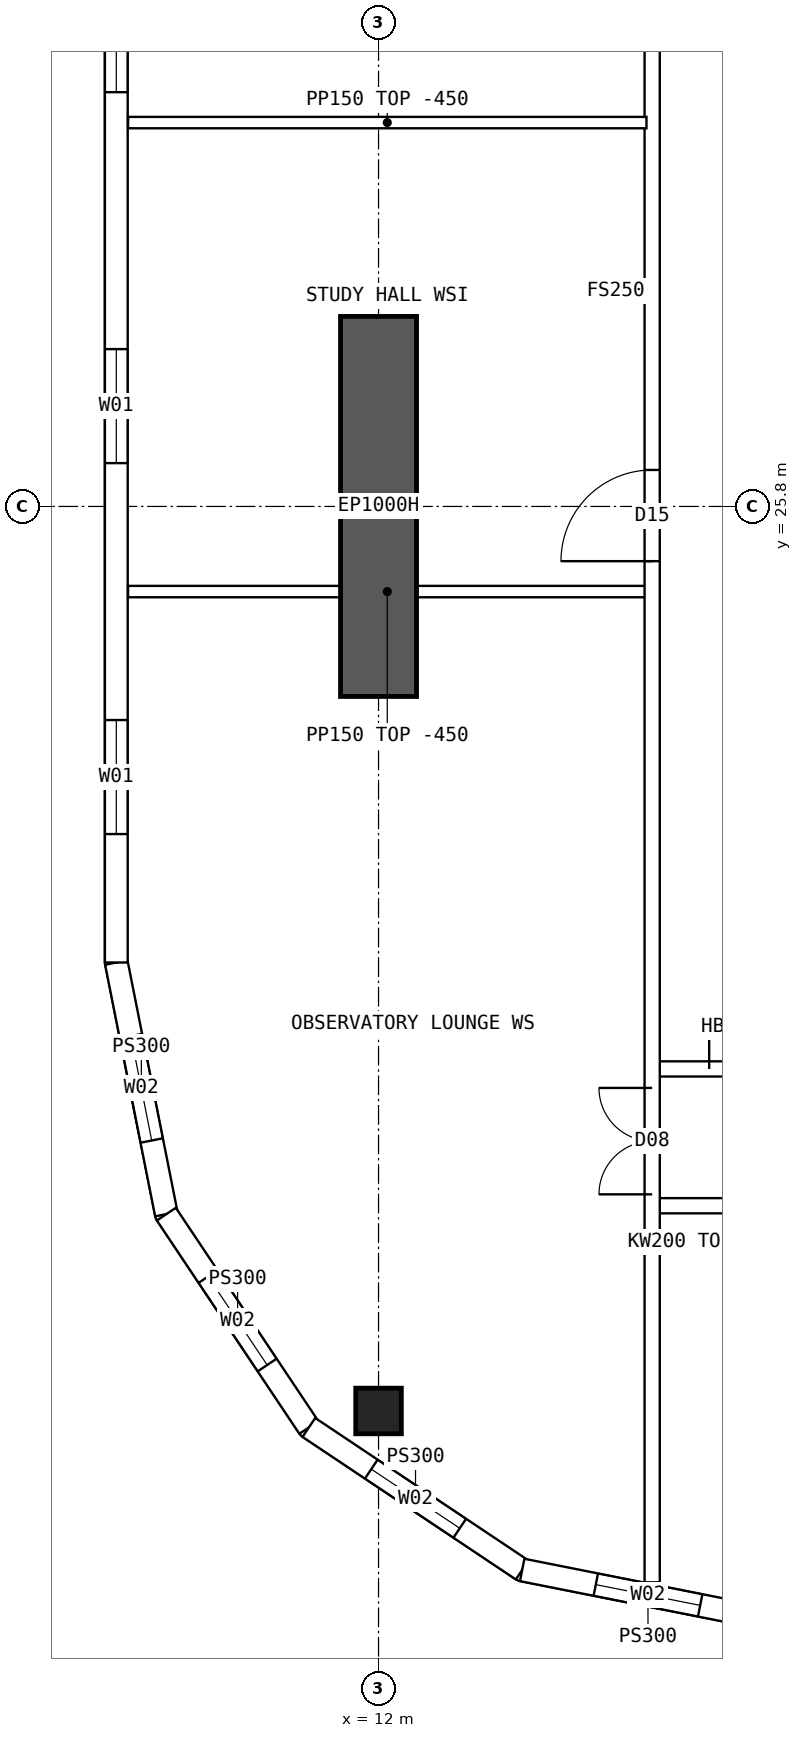
"""IFC4 building model, lengths in metres.
Left out: names, types, materials, properties, quantities, classifications, styles, units other than length and angle.
Written with IfcOpenShell. Run it as: python <this file> out.ifc"""

import sys

from ifc_helpers import new_model, si_unit, direction, frame, frame_2d, origin, origin_2d, place, context, subcontext, project, spatial, polyline, rectangle, hollow_rectangle, outline, extrude, element, fill, save


model = new_model("IFC4")
c1 = context("Model", 3, precision=1e-05, world=origin(), true_north=direction((0.0, 1.0)))
c2 = subcontext(c1, "Body", "Model", "MODEL_VIEW")
j1 = project(units=[si_unit("LENGTHUNIT", "METRE"), si_unit("PLANEANGLEUNIT", "RADIAN")], contexts=[c1])
p1 = place(None, origin())
s1 = spatial("IfcSite", under=j1, at=p1, CompositionType="ELEMENT")
p2 = place(p1, origin())
s2 = spatial("IfcBuilding", under=s1, at=p2, CompositionType="ELEMENT")
p3 = place(p2, frame((0.0, 0.0, 212.8)))
s3 = spatial("IfcBuildingStorey", under=s2, at=p3, CompositionType="ELEMENT", Elevation=212.8)
p4 = place(p3, frame((12.0, 13.9, 0.0), z_axis=(0.0, 0.0, 1.0), x_axis=(1.0, 0.0, 0.0)))
e1 = element("IfcColumn", 1, at=p4, inside=s3, PredefinedType="COLUMN", context=c2, shape_type="SweptSolid", body=[
    extrude(hollow_rectangle(XDim=0.6, YDim=0.6, WallThickness=0.06, at=origin_2d()), origin(), (0.0, 0.0, 1.0), 3.75),
])
p5 = place(p3, frame((12.0, 23.3, 0.0), z_axis=(0.0, 0.0, 1.0), x_axis=(0.0, 1.0, 0.0)))
e2 = element("IfcWall", 2, at=p5, inside=s3, PredefinedType="SHEAR", context=c2, shape_type="SweptSolid", body=[
    extrude(rectangle(XDim=5.0, YDim=1.0, at=frame_2d((2.5, 0.0))), origin(), (0.0, 0.0, 1.0), 3.75),
])
p6 = place(p3, frame((8.55, 44.2, 0.0), z_axis=(0.0, 0.0, 1.0), x_axis=(0.0, -1.0, 0.0)))
e3 = element("IfcWall", 3, at=p6, inside=s3, PredefinedType="SOLIDWALL", context=c2, shape_type="SweptSolid", body=[
    extrude(outline(polyline([(-0.015, -0.15), (24.415, -0.15), (24.385, 0.15), (0.015, 0.15), (-0.015, -0.15)])), origin(), (0.0, 0.0, 1.0), 3.3),
])
p7 = place(p6, frame((1.69, 0.0, 0.9)))
e4 = element("IfcOpeningElement", 4, at=p7, cuts=e3, PredefinedType="OPENING", context=c2, shape_type="SweptSolid", body=[
    extrude(rectangle(XDim=1.5, YDim=2.0, at=frame_2d((0.75, 1.0))), frame((0.0, 0.16, 0.0), z_axis=(0.0, -1.0, 0.0), x_axis=(1.0, 0.0, 0.0)), (0.0, 0.0, 1.0), 0.32),
])
p8 = place(p6, frame((6.57, 0.0, 0.9)))
e5 = element("IfcOpeningElement", 5, at=p8, cuts=e3, PredefinedType="OPENING", context=c2, shape_type="SweptSolid", body=[
    extrude(rectangle(XDim=1.5, YDim=2.0, at=frame_2d((0.75, 1.0))), frame((0.0, 0.16, 0.0), z_axis=(0.0, -1.0, 0.0), x_axis=(1.0, 0.0, 0.0)), (0.0, 0.0, 1.0), 0.32),
])
p9 = place(p6, frame((11.45, 0.0, 0.9)))
e6 = element("IfcOpeningElement", 6, at=p9, cuts=e3, PredefinedType="OPENING", context=c2, shape_type="SweptSolid", body=[
    extrude(rectangle(XDim=1.5, YDim=2.0, at=frame_2d((0.75, 1.0))), frame((0.0, 0.16, 0.0), z_axis=(0.0, -1.0, 0.0), x_axis=(1.0, 0.0, 0.0)), (0.0, 0.0, 1.0), 0.32),
])
p10 = place(p6, frame((16.33, 0.0, 0.9)))
e7 = element("IfcOpeningElement", 7, at=p10, cuts=e3, PredefinedType="OPENING", context=c2, shape_type="SweptSolid", body=[
    extrude(rectangle(XDim=1.5, YDim=2.0, at=frame_2d((0.75, 1.0))), frame((0.0, 0.16, 0.0), z_axis=(0.0, -1.0, 0.0), x_axis=(1.0, 0.0, 0.0)), (0.0, 0.0, 1.0), 0.32),
])
p11 = place(p6, frame((21.21, 0.0, 0.9)))
e8 = element("IfcOpeningElement", 8, at=p11, cuts=e3, PredefinedType="OPENING", context=c2, shape_type="SweptSolid", body=[
    extrude(rectangle(XDim=1.5, YDim=2.0, at=frame_2d((0.75, 1.0))), frame((0.0, 0.16, 0.0), z_axis=(0.0, -1.0, 0.0), x_axis=(1.0, 0.0, 0.0)), (0.0, 0.0, 1.0), 0.32),
])
p12 = place(p3, frame((8.55, 19.8, 0.0), z_axis=(0.0, 0.0, 1.0), x_axis=(0.19508664885, -0.980786011034, 0.0)))
e9 = element("IfcWall", 9, at=p12, inside=s3, PredefinedType="SOLIDWALL", context=c2, shape_type="SweptSolid", body=[
    extrude(outline(polyline([(-0.015, -0.15), (3.405, -0.15), (3.345, 0.15), (0.015, 0.15), (-0.015, -0.15)])), origin(), (0.0, 0.0, 1.0), 3.3),
])
p13 = place(p12, frame((0.988, 0.0, 0.9)))
e10 = element("IfcOpeningElement", 10, at=p13, cuts=e9, PredefinedType="OPENING", context=c2, shape_type="SweptSolid", body=[
    extrude(rectangle(XDim=1.4, YDim=1.8, at=frame_2d((0.7, 0.9))), frame((0.0, 0.16, 0.0), z_axis=(0.0, -1.0, 0.0), x_axis=(1.0, 0.0, 0.0)), (0.0, 0.0, 1.0), 0.32),
])
p14 = place(p3, frame((9.208, 16.49, 0.0), z_axis=(0.0, 0.0, 1.0), x_axis=(0.555567969291, -0.831471124873, 0.0)))
e11 = element("IfcWall", 11, at=p14, inside=s3, PredefinedType="SOLIDWALL", context=c2, shape_type="SweptSolid", body=[
    extrude(outline(polyline([(-0.03, -0.15), (3.405, -0.15), (3.345, 0.15), (0.03, 0.15), (-0.03, -0.15)])), origin(), (0.0, 0.0, 1.0), 3.3),
])
p15 = place(p14, frame((0.988, 0.0, 0.9)))
e12 = element("IfcOpeningElement", 12, at=p15, cuts=e11, PredefinedType="OPENING", context=c2, shape_type="SweptSolid", body=[
    extrude(rectangle(XDim=1.4, YDim=1.8, at=frame_2d((0.7, 0.9))), frame((0.0, 0.16, 0.0), z_axis=(0.0, -1.0, 0.0), x_axis=(1.0, 0.0, 0.0)), (0.0, 0.0, 1.0), 0.32),
])
p16 = place(p3, frame((11.083, 13.684, 0.0), z_axis=(0.0, 0.0, 1.0), x_axis=(0.831460037396, -0.555584562613, 0.0)))
e13 = element("IfcWall", 13, at=p16, inside=s3, PredefinedType="SOLIDWALL", context=c2, shape_type="SweptSolid", body=[
    extrude(outline(polyline([(-0.03, -0.15), (3.405, -0.15), (3.345, 0.15), (0.03, 0.15), (-0.03, -0.15)])), origin(), (0.0, 0.0, 1.0), 3.3),
])
p17 = place(p16, frame((0.988, 0.0, 0.9)))
e14 = element("IfcOpeningElement", 14, at=p17, cuts=e13, PredefinedType="OPENING", context=c2, shape_type="SweptSolid", body=[
    extrude(rectangle(XDim=1.4, YDim=1.8, at=frame_2d((0.7, 0.9))), frame((0.0, 0.16, 0.0), z_axis=(0.0, -1.0, 0.0), x_axis=(1.0, 0.0, 0.0)), (0.0, 0.0, 1.0), 0.32),
])
p18 = place(p3, frame((13.89, 11.808, 0.0), z_axis=(0.0, 0.0, 1.0), x_axis=(0.98078325777, -0.195100490205, 0.0)))
e15 = element("IfcWall", 15, at=p18, inside=s3, PredefinedType="SOLIDWALL", context=c2, shape_type="SweptSolid", body=[
    extrude(outline(polyline([(-0.03, -0.15), (3.405, -0.15), (3.345, 0.15), (0.03, 0.15), (-0.03, -0.15)])), origin(), (0.0, 0.0, 1.0), 3.3),
])
p19 = place(p18, frame((0.988, 0.0, 0.9)))
e16 = element("IfcOpeningElement", 16, at=p19, cuts=e15, PredefinedType="OPENING", context=c2, shape_type="SweptSolid", body=[
    extrude(rectangle(XDim=1.4, YDim=1.8, at=frame_2d((0.7, 0.9))), frame((0.0, 0.16, 0.0), z_axis=(0.0, -1.0, 0.0), x_axis=(1.0, 0.0, 0.0)), (0.0, 0.0, 1.0), 0.32),
])
p20 = place(p3, frame((15.6, 16.6, 0.0), z_axis=(0.0, 0.0, 1.0), x_axis=(1.0, 0.0, 0.0)))
e17 = element("IfcWall", 17, at=p20, inside=s3, PredefinedType="SOLIDWALL", context=c2, shape_type="SweptSolid", body=[
    extrude(rectangle(XDim=2.05, YDim=0.2, at=frame_2d((1.025, 0.0))), origin(), (0.0, 0.0, 1.0), 3.3),
])
p21 = place(p20, frame((0.95, 0.0, 0.0)))
e18 = element("IfcOpeningElement", 18, at=p21, cuts=e17, PredefinedType="OPENING", context=c2, shape_type="SweptSolid", body=[
    extrude(rectangle(XDim=0.9, YDim=2.1, at=frame_2d((0.45, 1.05))), frame((0.0, 0.11, 0.0), z_axis=(0.0, -1.0, 0.0), x_axis=(1.0, 0.0, 0.0)), (0.0, 0.0, 1.0), 0.22),
])
p22 = place(p3, frame((15.6, 18.4, 0.0), z_axis=(0.0, 0.0, 1.0), x_axis=(1.0, 0.0, 0.0)))
e19 = element("IfcWall", 19, at=p22, inside=s3, PredefinedType="SOLIDWALL", context=c2, shape_type="SweptSolid", body=[
    extrude(rectangle(XDim=2.05, YDim=0.2, at=frame_2d((1.025, 0.0))), origin(), (0.0, 0.0, 1.0), 3.3),
])
p23 = place(p22, frame((0.75, 0.0, 0.0)))
e20 = element("IfcOpeningElement", 20, at=p23, cuts=e19, PredefinedType="OPENING", context=c2, shape_type="SweptSolid", body=[
    extrude(rectangle(XDim=1.2, YDim=2.1, at=frame_2d((0.6, 1.05))), frame((0.0, 0.11, 0.0), z_axis=(0.0, -1.0, 0.0), x_axis=(1.0, 0.0, 0.0)), (0.0, 0.0, 1.0), 0.22),
])
p24 = place(p3, frame((8.705, 30.85, 0.0), z_axis=(0.0, 0.0, 1.0), x_axis=(1.0, 0.0, 0.0)))
e21 = element("IfcWall", 21, at=p24, inside=s3, PredefinedType="PARTITIONING", context=c2, shape_type="SweptSolid", body=[
    extrude(outline(polyline([(0.0, 0.0), (6.82, 0.0), (6.82, 3.3), (3.597, 3.3), (3.595, 2.85), (2.997, 2.85), (2.995, 3.3), (0.0, 3.3), (0.0, 0.0)])), frame((0.0, 0.075, 0.0), z_axis=(0.0, -1.0, 0.0), x_axis=(1.0, 0.0, 0.0)), (0.0, 0.0, 1.0), 0.15),
])
p25 = place(p3, frame((15.6, 11.646, 0.0), z_axis=(0.0, 0.0, 1.0), x_axis=(0.0, 1.0, 0.0)))
e22 = element("IfcWall", 22, at=p25, inside=s3, PredefinedType="SOLIDWALL", context=c2, shape_type="SweptSolid", body=[
    extrude(rectangle(XDim=40.708, YDim=0.2, at=frame_2d((20.354, 0.0))), origin(), (0.0, 0.0, 1.0), 3.3),
])
p26 = place(p25, frame((13.434, 0.0, 0.0)))
e23 = element("IfcOpeningElement", 23, at=p26, cuts=e22, PredefinedType="OPENING", context=c2, shape_type="SweptSolid", body=[
    extrude(rectangle(XDim=1.2, YDim=2.1, at=frame_2d((0.6, 1.05))), frame((0.0, 0.11, 0.0), z_axis=(0.0, -1.0, 0.0), x_axis=(1.0, 0.0, 0.0)), (0.0, 0.0, 1.0), 0.22),
])
p27 = place(p25, frame((5.104, 0.0, 0.0)))
e24 = element("IfcOpeningElement", 24, at=p27, cuts=e22, PredefinedType="OPENING", context=c2, shape_type="SweptSolid", body=[
    extrude(rectangle(XDim=1.4, YDim=2.1, at=frame_2d((0.7, 1.05))), frame((0.0, 0.11, 0.0), z_axis=(0.0, -1.0, 0.0), x_axis=(1.0, 0.0, 0.0)), (0.0, 0.0, 1.0), 0.22),
])
p28 = place(p25, frame((34.104, 0.0, 0.0)))
e25 = element("IfcOpeningElement", 25, at=p28, cuts=e22, PredefinedType="OPENING", context=c2, shape_type="SweptSolid", body=[
    extrude(rectangle(XDim=1.4, YDim=2.1, at=frame_2d((0.7, 1.05))), frame((0.0, 0.11, 0.0), z_axis=(0.0, -1.0, 0.0), x_axis=(1.0, 0.0, 0.0)), (0.0, 0.0, 1.0), 0.22),
])
p29 = place(p3, frame((8.705, 24.68, 0.0), z_axis=(0.0, 0.0, 1.0), x_axis=(1.0, 0.0, 0.0)))
e26 = element("IfcWall", 26, at=p29, inside=s3, PredefinedType="PARTITIONING", context=c2, shape_type="SweptSolid", body=[
    extrude(rectangle(XDim=6.82, YDim=0.15, at=frame_2d((3.41, 0.0))), origin(), (0.0, 0.0, 1.0), 3.3),
])
p30 = place(p9, origin())
e27 = element("IfcWindow", 27, at=p30, inside=s3, PartitioningType="SINGLE_PANEL", PredefinedType="WINDOW", context=c2, shape_type="SweptSolid", body=[
    extrude(rectangle(XDim=1.5, YDim=2.0, at=frame_2d((0.75, 1.0))), frame((0.0, 0.03, 0.0), z_axis=(0.0, -1.0, 0.0), x_axis=(1.0, 0.0, 0.0)), (0.0, 0.0, 1.0), 0.06),
])
fill(e6, e27)
p31 = place(p10, origin())
e28 = element("IfcWindow", 28, at=p31, inside=s3, PartitioningType="SINGLE_PANEL", PredefinedType="WINDOW", context=c2, shape_type="SweptSolid", body=[
    extrude(rectangle(XDim=1.5, YDim=2.0, at=frame_2d((0.75, 1.0))), frame((0.0, 0.03, 0.0), z_axis=(0.0, -1.0, 0.0), x_axis=(1.0, 0.0, 0.0)), (0.0, 0.0, 1.0), 0.06),
])
fill(e7, e28)
p32 = place(p11, origin())
e29 = element("IfcWindow", 29, at=p32, inside=s3, PartitioningType="SINGLE_PANEL", PredefinedType="WINDOW", context=c2, shape_type="SweptSolid", body=[
    extrude(rectangle(XDim=1.5, YDim=2.0, at=frame_2d((0.75, 1.0))), frame((0.0, 0.03, 0.0), z_axis=(0.0, -1.0, 0.0), x_axis=(1.0, 0.0, 0.0)), (0.0, 0.0, 1.0), 0.06),
])
fill(e8, e29)
p33 = place(p13, origin())
e30 = element("IfcWindow", 30, at=p33, inside=s3, PartitioningType="SINGLE_PANEL", PredefinedType="WINDOW", context=c2, shape_type="SweptSolid", body=[
    extrude(rectangle(XDim=1.4, YDim=1.8, at=frame_2d((0.7, 0.9))), frame((0.0, 0.03, 0.0), z_axis=(0.0, -1.0, 0.0), x_axis=(1.0, 0.0, 0.0)), (0.0, 0.0, 1.0), 0.06),
])
fill(e10, e30)
p34 = place(p15, origin())
e31 = element("IfcWindow", 31, at=p34, inside=s3, PartitioningType="SINGLE_PANEL", PredefinedType="WINDOW", context=c2, shape_type="SweptSolid", body=[
    extrude(rectangle(XDim=1.4, YDim=1.8, at=frame_2d((0.7, 0.9))), frame((0.0, 0.03, 0.0), z_axis=(0.0, -1.0, 0.0), x_axis=(1.0, 0.0, 0.0)), (0.0, 0.0, 1.0), 0.06),
])
fill(e12, e31)
p35 = place(p17, origin())
e32 = element("IfcWindow", 32, at=p35, inside=s3, PartitioningType="SINGLE_PANEL", PredefinedType="WINDOW", context=c2, shape_type="SweptSolid", body=[
    extrude(rectangle(XDim=1.4, YDim=1.8, at=frame_2d((0.7, 0.9))), frame((0.0, 0.03, 0.0), z_axis=(0.0, -1.0, 0.0), x_axis=(1.0, 0.0, 0.0)), (0.0, 0.0, 1.0), 0.06),
])
fill(e14, e32)
p36 = place(p19, origin())
e33 = element("IfcWindow", 33, at=p36, inside=s3, PartitioningType="SINGLE_PANEL", PredefinedType="WINDOW", context=c2, shape_type="SweptSolid", body=[
    extrude(rectangle(XDim=1.4, YDim=1.8, at=frame_2d((0.7, 0.9))), frame((0.0, 0.03, 0.0), z_axis=(0.0, -1.0, 0.0), x_axis=(1.0, 0.0, 0.0)), (0.0, 0.0, 1.0), 0.06),
])
fill(e16, e33)
p37 = place(p23, origin())
e34 = element("IfcDoor", 34, at=p37, inside=s3, OperationType="DOUBLE_DOOR_SINGLE_SWING", PredefinedType="DOOR", context=c2, shape_type="SweptSolid", body=[
    extrude(rectangle(XDim=1.2, YDim=2.1, at=frame_2d((0.6, 1.05))), frame((0.0, 0.025, 0.0), z_axis=(0.0, -1.0, 0.0), x_axis=(1.0, 0.0, 0.0)), (0.0, 0.0, 1.0), 0.05),
])
fill(e20, e34)
p38 = place(p26, origin())
e35 = element("IfcDoor", 35, at=p38, inside=s3, OperationType="SINGLE_SWING_LEFT", PredefinedType="DOOR", context=c2, shape_type="SweptSolid", body=[
    extrude(rectangle(XDim=1.2, YDim=2.1, at=frame_2d((0.6, 1.05))), frame((0.0, 0.025, 0.0), z_axis=(0.0, -1.0, 0.0), x_axis=(1.0, 0.0, 0.0)), (0.0, 0.0, 1.0), 0.05),
])
fill(e23, e35)
p39 = place(p27, origin())
e36 = element("IfcDoor", 36, at=p39, inside=s3, OperationType="DOUBLE_DOOR_SINGLE_SWING", PredefinedType="DOOR", context=c2, shape_type="SweptSolid", body=[
    extrude(rectangle(XDim=1.4, YDim=2.1, at=frame_2d((0.7, 1.05))), frame((0.0, 0.025, 0.0), z_axis=(0.0, -1.0, 0.0), x_axis=(1.0, 0.0, 0.0)), (0.0, 0.0, 1.0), 0.05),
])
fill(e24, e36)
save(model, sys.argv[1])
